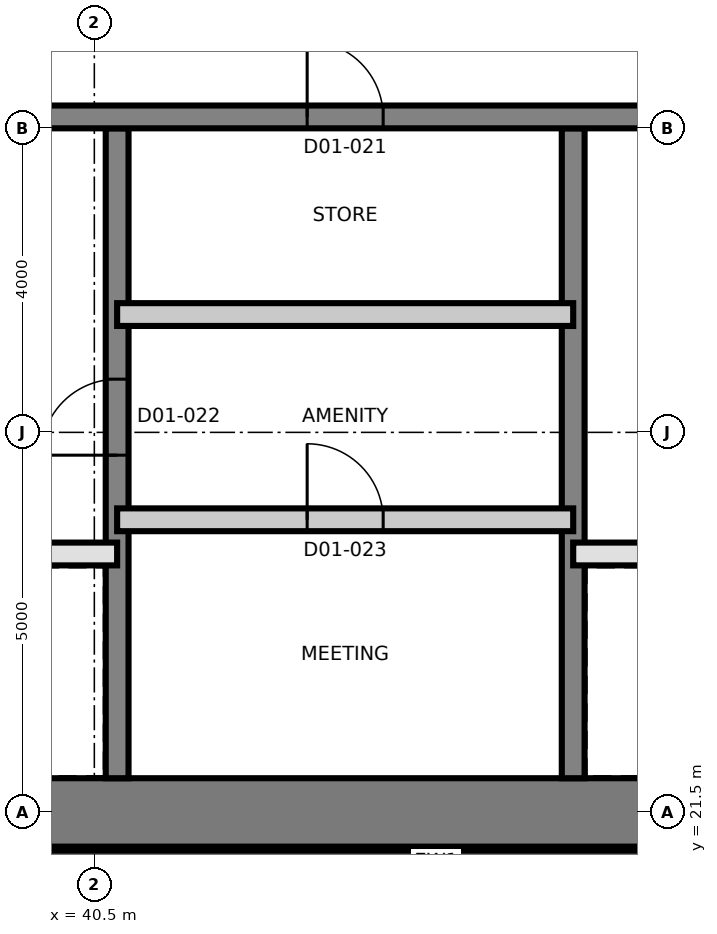
"""IFC4 building model, lengths in metres.
Left out: names, types, materials, properties, quantities, classifications, styles, units other than length and angle.
Written with IfcOpenShell. Run it as: python <this file> out.ifc"""

import sys

from ifc_helpers import new_model, si_unit, direction, frame, frame_2d, origin, place, context, subcontext, project, spatial, rectangle, extrude, element, fill, save


model = new_model("IFC4")
c1 = context("Model", 3, precision=1e-05, world=origin(), true_north=direction((0.0, 1.0)))
c2 = subcontext(c1, "Body", "Model", "MODEL_VIEW")
j1 = project(units=[si_unit("LENGTHUNIT", "METRE"), si_unit("PLANEANGLEUNIT", "RADIAN")], contexts=[c1])
p1 = place(None, origin())
s1 = spatial("IfcSite", under=j1, at=p1, CompositionType="ELEMENT")
p2 = place(p1, origin())
s2 = spatial("IfcBuilding", under=s1, at=p2, CompositionType="ELEMENT")
p3 = place(p2, frame((0.0, 0.0, 37.2)))
s3 = spatial("IfcBuildingStorey", under=s2, at=p3, CompositionType="ELEMENT", Elevation=37.2)
p4 = place(p3, frame((31.05, 21.5, 0.0), z_axis=(0.0, 0.0, 1.0), x_axis=(1.0, 0.0, 0.0)))
e1 = element("IfcWall", 1, at=p4, inside=s3, PredefinedType="SHEAR", context=c2, shape_type="SweptSolid", body=[
    extrude(rectangle(XDim=27.0, YDim=0.9, at=frame_2d((13.5, 0.0))), origin(), (0.0, 0.0, 1.0), 3.7),
])
p5 = place(p3, frame((40.8, 21.95, 0.0), z_axis=(0.0, 0.0, 1.0), x_axis=(0.0, 1.0, 0.0)))
e2 = element("IfcWall", 2, at=p5, inside=s3, PredefinedType="SHEAR", context=c2, shape_type="SweptSolid", body=[
    extrude(rectangle(XDim=8.55, YDim=0.3, at=frame_2d((4.275, 0.0))), origin(), (0.0, 0.0, 1.0), 3.7),
])
p6 = place(p5, frame((4.25, 0.0, 0.0)))
e3 = element("IfcOpeningElement", 3, at=p6, cuts=e2, PredefinedType="OPENING", context=c2, shape_type="SweptSolid", body=[
    extrude(rectangle(XDim=1.0, YDim=2.1, at=frame_2d((0.5, 1.05))), frame((0.0, 0.16, 0.0), z_axis=(0.0, -1.0, 0.0), x_axis=(1.0, 0.0, 0.0)), (0.0, 0.0, 1.0), 0.32),
])
p7 = place(p3, frame((46.8, 21.95, 0.0), z_axis=(0.0, 0.0, 1.0), x_axis=(0.0, 1.0, 0.0)))
e4 = element("IfcWall", 4, at=p7, inside=s3, PredefinedType="SHEAR", context=c2, shape_type="SweptSolid", body=[
    extrude(rectangle(XDim=8.55, YDim=0.3, at=frame_2d((4.275, 0.0))), origin(), (0.0, 0.0, 1.0), 3.7),
])
p8 = place(p3, frame((31.95, 30.65, 0.0), z_axis=(0.0, 0.0, 1.0), x_axis=(1.0, 0.0, 0.0)))
e5 = element("IfcWall", 5, at=p8, inside=s3, PredefinedType="SHEAR", context=c2, shape_type="SweptSolid", body=[
    extrude(rectangle(XDim=26.1, YDim=0.3, at=frame_2d((13.05, 0.0))), origin(), (0.0, 0.0, 1.0), 3.7),
])
p9 = place(p8, frame((24.55, 0.0, 0.0)))
e6 = element("IfcOpeningElement", 6, at=p9, cuts=e5, PredefinedType="OPENING", context=c2, shape_type="SweptSolid", body=[
    extrude(rectangle(XDim=1.0, YDim=2.1, at=frame_2d((0.5, 1.05))), frame((0.0, 0.16, 0.0), z_axis=(0.0, -1.0, 0.0), x_axis=(1.0, 0.0, 0.0)), (0.0, 0.0, 1.0), 0.32),
])
p10 = place(p8, frame((11.35, 0.0, 0.0)))
e7 = element("IfcOpeningElement", 7, at=p10, cuts=e5, PredefinedType="OPENING", context=c2, shape_type="SweptSolid", body=[
    extrude(rectangle(XDim=1.0, YDim=2.1, at=frame_2d((0.5, 1.05))), frame((0.0, 0.16, 0.0), z_axis=(0.0, -1.0, 0.0), x_axis=(1.0, 0.0, 0.0)), (0.0, 0.0, 1.0), 0.32),
])
p11 = place(p3, frame((31.36, 20.85, 0.0), z_axis=(0.0, 0.0, 1.0), x_axis=(1.0, 0.0, 0.0)))
e8 = element("IfcWall", 8, at=p11, inside=s3, PredefinedType="SOLIDWALL", context=c2, shape_type="SweptSolid", body=[
    extrude(rectangle(XDim=27.281, YDim=0.3, at=frame_2d((13.64, 0.0))), origin(), (0.0, 0.0, 1.0), 3.4),
])
p12 = place(p3, frame((31.8, 24.9, 0.0), z_axis=(0.0, 0.0, 1.0), x_axis=(1.0, 0.0, 0.0)))
e9 = element("IfcWall", 9, at=p12, inside=s3, PredefinedType="SOLIDWALL", context=c2, shape_type="SweptSolid", body=[
    extrude(rectangle(XDim=9.0, YDim=0.3, at=frame_2d((4.5, 0.0))), origin(), (0.0, 0.0, 1.0), 3.4),
])
p13 = place(p12, frame((7.05, 0.0, 0.0)))
e10 = element("IfcOpeningElement", 10, at=p13, cuts=e9, PredefinedType="OPENING", context=c2, shape_type="SweptSolid", body=[
    extrude(rectangle(XDim=0.9, YDim=2.1, at=frame_2d((0.45, 1.05))), frame((0.0, 0.16, 0.0), z_axis=(0.0, -1.0, 0.0), x_axis=(1.0, 0.0, 0.0)), (0.0, 0.0, 1.0), 0.32),
])
p14 = place(p12, frame((0.95, 0.0, 0.0)))
e11 = element("IfcOpeningElement", 11, at=p14, cuts=e9, PredefinedType="OPENING", context=c2, shape_type="SweptSolid", body=[
    extrude(rectangle(XDim=1.1, YDim=2.4, at=frame_2d((0.55, 1.2))), frame((0.0, 0.16, 0.0), z_axis=(0.0, -1.0, 0.0), x_axis=(1.0, 0.0, 0.0)), (0.0, 0.0, 1.0), 0.32),
])
p15 = place(p12, frame((3.95, 0.0, 0.0)))
e12 = element("IfcOpeningElement", 12, at=p15, cuts=e9, PredefinedType="OPENING", context=c2, shape_type="SweptSolid", body=[
    extrude(rectangle(XDim=1.1, YDim=2.4, at=frame_2d((0.55, 1.2))), frame((0.0, 0.16, 0.0), z_axis=(0.0, -1.0, 0.0), x_axis=(1.0, 0.0, 0.0)), (0.0, 0.0, 1.0), 0.32),
])
p16 = place(p3, frame((46.8, 24.9, 0.0), z_axis=(0.0, 0.0, 1.0), x_axis=(1.0, 0.0, 0.0)))
e13 = element("IfcWall", 13, at=p16, inside=s3, PredefinedType="SOLIDWALL", context=c2, shape_type="SweptSolid", body=[
    extrude(rectangle(XDim=9.0, YDim=0.3, at=frame_2d((4.5, 0.0))), origin(), (0.0, 0.0, 1.0), 3.4),
])
p17 = place(p16, frame((1.05, 0.0, 0.0)))
e14 = element("IfcOpeningElement", 14, at=p17, cuts=e13, PredefinedType="OPENING", context=c2, shape_type="SweptSolid", body=[
    extrude(rectangle(XDim=0.9, YDim=2.1, at=frame_2d((0.45, 1.05))), frame((0.0, 0.16, 0.0), z_axis=(0.0, -1.0, 0.0), x_axis=(1.0, 0.0, 0.0)), (0.0, 0.0, 1.0), 0.32),
])
p18 = place(p3, frame((40.8, 25.35, 0.0), z_axis=(0.0, 0.0, 1.0), x_axis=(1.0, 0.0, 0.0)))
e15 = element("IfcWall", 15, at=p18, inside=s3, PredefinedType="PARTITIONING", context=c2, shape_type="SweptSolid", body=[
    extrude(rectangle(XDim=6.0, YDim=0.3, at=frame_2d((3.0, 0.0))), origin(), (0.0, 0.0, 1.0), 3.4),
])
p19 = place(p18, frame((2.5, 0.0, 0.0)))
e16 = element("IfcOpeningElement", 16, at=p19, cuts=e15, PredefinedType="OPENING", context=c2, shape_type="SweptSolid", body=[
    extrude(rectangle(XDim=1.0, YDim=2.1, at=frame_2d((0.5, 1.05))), frame((0.0, 0.16, 0.0), z_axis=(0.0, -1.0, 0.0), x_axis=(1.0, 0.0, 0.0)), (0.0, 0.0, 1.0), 0.32),
])
p20 = place(p3, frame((40.8, 28.05, 0.0), z_axis=(0.0, 0.0, 1.0), x_axis=(1.0, 0.0, 0.0)))
e17 = element("IfcWall", 17, at=p20, inside=s3, PredefinedType="PARTITIONING", context=c2, shape_type="SweptSolid", body=[
    extrude(rectangle(XDim=6.0, YDim=0.3, at=frame_2d((3.0, 0.0))), origin(), (0.0, 0.0, 1.0), 3.4),
])
p21 = place(p10, origin())
e18 = element("IfcDoor", 18, at=p21, inside=s3, OperationType="SINGLE_SWING_LEFT", PredefinedType="DOOR", context=c2, shape_type="SweptSolid", body=[
    extrude(rectangle(XDim=1.0, YDim=2.1, at=frame_2d((0.5, 1.05))), frame((0.0, 0.025, 0.0), z_axis=(0.0, -1.0, 0.0), x_axis=(1.0, 0.0, 0.0)), (0.0, 0.0, 1.0), 0.05),
])
fill(e7, e18)
p22 = place(p6, origin())
e19 = element("IfcDoor", 19, at=p22, inside=s3, OperationType="SINGLE_SWING_RIGHT", PredefinedType="DOOR", context=c2, shape_type="SweptSolid", body=[
    extrude(rectangle(XDim=1.0, YDim=2.1, at=frame_2d((0.5, 1.05))), frame((0.0, 0.025, 0.0), z_axis=(0.0, -1.0, 0.0), x_axis=(1.0, 0.0, 0.0)), (0.0, 0.0, 1.0), 0.05),
])
fill(e3, e19)
p23 = place(p19, origin())
e20 = element("IfcDoor", 20, at=p23, inside=s3, OperationType="SINGLE_SWING_RIGHT", PredefinedType="DOOR", context=c2, shape_type="SweptSolid", body=[
    extrude(rectangle(XDim=1.0, YDim=2.1, at=frame_2d((0.5, 1.05))), frame((0.0, 0.025, 0.0), z_axis=(0.0, -1.0, 0.0), x_axis=(1.0, 0.0, 0.0)), (0.0, 0.0, 1.0), 0.05),
])
fill(e16, e20)
save(model, sys.argv[1])
